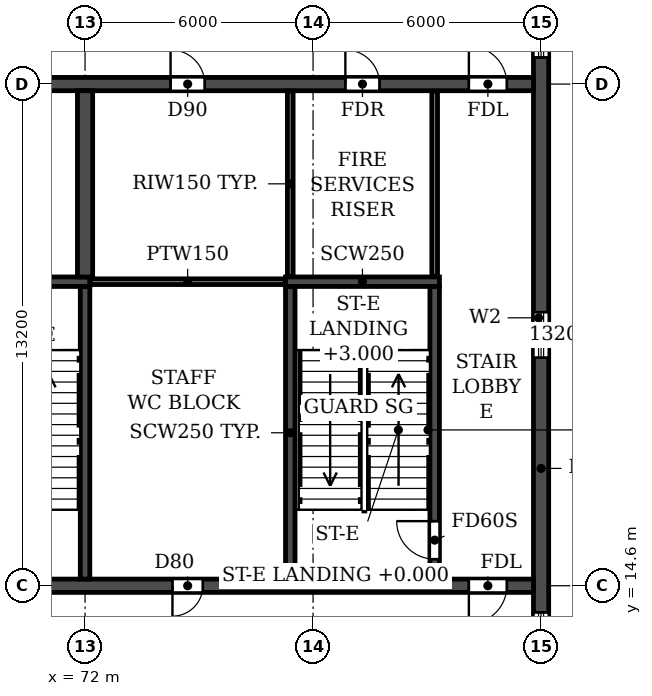
"""IFC4 building model, lengths in metres.
Left out: names, types, materials, properties, quantities, classifications, styles, units other than length and angle.
Written with IfcOpenShell. Run it as: python <this file> out.ifc"""

import sys

from ifc_helpers import new_model, si_unit, direction, frame, frame_2d, origin, place, context, subcontext, project, spatial, rectangle, extrude, element, fill, save


model = new_model("IFC4")
c1 = context("Model", 3, precision=1e-05, world=origin(), true_north=direction((0.0, 1.0)))
c2 = subcontext(c1, "Body", "Model", "MODEL_VIEW")
j1 = project(units=[si_unit("LENGTHUNIT", "METRE"), si_unit("PLANEANGLEUNIT", "RADIAN")], contexts=[c1])
p1 = place(None, origin())
s1 = spatial("IfcSite", under=j1, at=p1, CompositionType="ELEMENT")
p2 = place(p1, origin())
s2 = spatial("IfcBuilding", under=s1, at=p2, CompositionType="ELEMENT")
p3 = place(p2, frame((0.0, 0.0, 261.0)))
s3 = spatial("IfcBuildingStorey", under=s2, at=p3, CompositionType="ELEMENT", Elevation=261.0)
p4 = place(p3, frame((84.0, 4.683, 0.0), z_axis=(0.0, 0.0, 1.0), x_axis=(0.0, 1.0, 0.0)))
e1 = element("IfcWall", 1, at=p4, inside=s3, PredefinedType="SHEAR", context=c2, shape_type="SweptSolid", body=[
    extrude(rectangle(XDim=31.834, YDim=0.4, at=frame_2d((15.917, 0.0))), origin(), (0.0, 0.0, 1.0), 5.7),
])
p5 = place(p4, frame((23.817, 0.0, 0.9)))
e2 = element("IfcOpeningElement", 2, at=p5, cuts=e1, PredefinedType="OPENING", context=c2, shape_type="SweptSolid", body=[
    extrude(rectangle(XDim=1.2, YDim=1.5, at=frame_2d((0.6, 0.75))), frame((0.0, 0.21, 0.0), z_axis=(0.0, -1.0, 0.0), x_axis=(1.0, 0.0, 0.0)), (0.0, 0.0, 1.0), 0.42),
])
p6 = place(p4, frame((8.017, 0.0, 0.9)))
e3 = element("IfcOpeningElement", 3, at=p6, cuts=e1, PredefinedType="OPENING", context=c2, shape_type="SweptSolid", body=[
    extrude(rectangle(XDim=1.2, YDim=1.5, at=frame_2d((0.6, 0.75))), frame((0.0, 0.21, 0.0), z_axis=(0.0, -1.0, 0.0), x_axis=(1.0, 0.0, 0.0)), (0.0, 0.0, 1.0), 0.42),
])
p7 = place(p4, frame((27.694, 0.0, 0.6)))
e4 = element("IfcOpeningElement", 4, at=p7, cuts=e1, PredefinedType="OPENING", context=c2, shape_type="SweptSolid", body=[
    extrude(rectangle(XDim=2.2, YDim=1.8, at=frame_2d((1.1, 0.9))), frame((0.0, 0.21, 0.0), z_axis=(0.0, -1.0, 0.0), x_axis=(1.0, 0.0, 0.0)), (0.0, 0.0, 1.0), 0.42),
])
p8 = place(p4, frame((2.541, 0.0, 0.6)))
e5 = element("IfcOpeningElement", 5, at=p8, cuts=e1, PredefinedType="OPENING", context=c2, shape_type="SweptSolid", body=[
    extrude(rectangle(XDim=2.2, YDim=1.8, at=frame_2d((1.1, 0.9))), frame((0.0, 0.21, 0.0), z_axis=(0.0, -1.0, 0.0), x_axis=(1.0, 0.0, 0.0)), (0.0, 0.0, 1.0), 0.42),
])
p9 = place(p4, frame((15.917, 0.0, 0.9)))
e6 = element("IfcOpeningElement", 6, at=p9, cuts=e1, PredefinedType="OPENING", context=c2, shape_type="SweptSolid", body=[
    extrude(rectangle(XDim=1.2, YDim=1.5, at=frame_2d((0.6, 0.75))), frame((0.0, 0.21, 0.0), z_axis=(0.0, -1.0, 0.0), x_axis=(1.0, 0.0, 0.0)), (0.0, 0.0, 1.0), 0.42),
])
p10 = place(p3, frame((18.2, 14.6, 0.0), z_axis=(0.0, 0.0, 1.0), x_axis=(1.0, 0.0, 0.0)))
e7 = element("IfcWall", 7, at=p10, inside=s3, PredefinedType="SOLIDWALL", context=c2, shape_type="SweptSolid", body=[
    extrude(rectangle(XDim=65.6, YDim=0.35, at=frame_2d((32.8, 0.0))), origin(), (0.0, 0.0, 1.0), 5.7),
])
p11 = place(p10, frame((0.7, 0.0, 0.0)))
e8 = element("IfcOpeningElement", 8, at=p11, cuts=e7, PredefinedType="OPENING", context=c2, shape_type="SweptSolid", body=[
    extrude(rectangle(XDim=1.0, YDim=2.1, at=frame_2d((0.5, 1.05))), frame((0.0, 0.185, 0.0), z_axis=(0.0, -1.0, 0.0), x_axis=(1.0, 0.0, 0.0)), (0.0, 0.0, 1.0), 0.37),
])
p12 = place(p10, frame((8.7, 0.0, 0.0)))
e9 = element("IfcOpeningElement", 9, at=p12, cuts=e7, PredefinedType="OPENING", context=c2, shape_type="SweptSolid", body=[
    extrude(rectangle(XDim=0.8, YDim=2.1, at=frame_2d((0.4, 1.05))), frame((0.0, 0.185, 0.0), z_axis=(0.0, -1.0, 0.0), x_axis=(1.0, 0.0, 0.0)), (0.0, 0.0, 1.0), 0.37),
])
p13 = place(p10, frame((13.2, 0.0, 0.0)))
e10 = element("IfcOpeningElement", 10, at=p13, cuts=e7, PredefinedType="OPENING", context=c2, shape_type="SweptSolid", body=[
    extrude(rectangle(XDim=1.0, YDim=2.1, at=frame_2d((0.5, 1.05))), frame((0.0, 0.185, 0.0), z_axis=(0.0, -1.0, 0.0), x_axis=(1.0, 0.0, 0.0)), (0.0, 0.0, 1.0), 0.37),
])
p14 = place(p10, frame((25.55, 0.0, 0.0)))
e11 = element("IfcOpeningElement", 11, at=p14, cuts=e7, PredefinedType="OPENING", context=c2, shape_type="SweptSolid", body=[
    extrude(rectangle(XDim=1.5, YDim=2.1, at=frame_2d((0.75, 1.05))), frame((0.0, 0.185, 0.0), z_axis=(0.0, -1.0, 0.0), x_axis=(1.0, 0.0, 0.0)), (0.0, 0.0, 1.0), 0.37),
])
p15 = place(p10, frame((29.7, 0.0, 0.0)))
e12 = element("IfcOpeningElement", 12, at=p15, cuts=e7, PredefinedType="OPENING", context=c2, shape_type="SweptSolid", body=[
    extrude(rectangle(XDim=1.0, YDim=2.1, at=frame_2d((0.5, 1.05))), frame((0.0, 0.185, 0.0), z_axis=(0.0, -1.0, 0.0), x_axis=(1.0, 0.0, 0.0)), (0.0, 0.0, 1.0), 0.37),
])
p16 = place(p10, frame((32.3, 0.0, 0.0)))
e13 = element("IfcOpeningElement", 13, at=p16, cuts=e7, PredefinedType="OPENING", context=c2, shape_type="SweptSolid", body=[
    extrude(rectangle(XDim=1.0, YDim=2.1, at=frame_2d((0.5, 1.05))), frame((0.0, 0.185, 0.0), z_axis=(0.0, -1.0, 0.0), x_axis=(1.0, 0.0, 0.0)), (0.0, 0.0, 1.0), 0.37),
])
p17 = place(p10, frame((34.9, 0.0, 0.0)))
e14 = element("IfcOpeningElement", 14, at=p17, cuts=e7, PredefinedType="OPENING", context=c2, shape_type="SweptSolid", body=[
    extrude(rectangle(XDim=1.0, YDim=2.1, at=frame_2d((0.5, 1.05))), frame((0.0, 0.185, 0.0), z_axis=(0.0, -1.0, 0.0), x_axis=(1.0, 0.0, 0.0)), (0.0, 0.0, 1.0), 0.37),
])
p18 = place(p10, frame((38.55, 0.0, 0.0)))
e15 = element("IfcOpeningElement", 15, at=p18, cuts=e7, PredefinedType="OPENING", context=c2, shape_type="SweptSolid", body=[
    extrude(rectangle(XDim=1.5, YDim=2.1, at=frame_2d((0.75, 1.05))), frame((0.0, 0.185, 0.0), z_axis=(0.0, -1.0, 0.0), x_axis=(1.0, 0.0, 0.0)), (0.0, 0.0, 1.0), 0.37),
])
p19 = place(p10, frame((51.4, 0.0, 0.0)))
e16 = element("IfcOpeningElement", 16, at=p19, cuts=e7, PredefinedType="OPENING", context=c2, shape_type="SweptSolid", body=[
    extrude(rectangle(XDim=1.0, YDim=2.1, at=frame_2d((0.5, 1.05))), frame((0.0, 0.185, 0.0), z_axis=(0.0, -1.0, 0.0), x_axis=(1.0, 0.0, 0.0)), (0.0, 0.0, 1.0), 0.37),
])
p20 = place(p10, frame((56.1, 0.0, 0.0)))
e17 = element("IfcOpeningElement", 17, at=p20, cuts=e7, PredefinedType="OPENING", context=c2, shape_type="SweptSolid", body=[
    extrude(rectangle(XDim=0.8, YDim=2.1, at=frame_2d((0.4, 1.05))), frame((0.0, 0.185, 0.0), z_axis=(0.0, -1.0, 0.0), x_axis=(1.0, 0.0, 0.0)), (0.0, 0.0, 1.0), 0.37),
])
p21 = place(p10, frame((63.9, 0.0, 0.0)))
e18 = element("IfcOpeningElement", 18, at=p21, cuts=e7, PredefinedType="OPENING", context=c2, shape_type="SweptSolid", body=[
    extrude(rectangle(XDim=1.0, YDim=2.1, at=frame_2d((0.5, 1.05))), frame((0.0, 0.185, 0.0), z_axis=(0.0, -1.0, 0.0), x_axis=(1.0, 0.0, 0.0)), (0.0, 0.0, 1.0), 0.37),
])
p22 = place(p3, frame((18.2, 27.8, 0.0), z_axis=(0.0, 0.0, 1.0), x_axis=(1.0, 0.0, 0.0)))
e19 = element("IfcWall", 19, at=p22, inside=s3, PredefinedType="SOLIDWALL", context=c2, shape_type="SweptSolid", body=[
    extrude(rectangle(XDim=65.6, YDim=0.35, at=frame_2d((32.8, 0.0))), origin(), (0.0, 0.0, 1.0), 5.7),
])
p23 = place(p22, frame((0.7, 0.0, 0.0)))
e20 = element("IfcOpeningElement", 20, at=p23, cuts=e19, PredefinedType="OPENING", context=c2, shape_type="SweptSolid", body=[
    extrude(rectangle(XDim=1.0, YDim=2.1, at=frame_2d((0.5, 1.05))), frame((0.0, 0.185, 0.0), z_axis=(0.0, -1.0, 0.0), x_axis=(1.0, 0.0, 0.0)), (0.0, 0.0, 1.0), 0.37),
])
p24 = place(p22, frame((4.05, 0.0, 0.0)))
e21 = element("IfcOpeningElement", 21, at=p24, cuts=e19, PredefinedType="OPENING", context=c2, shape_type="SweptSolid", body=[
    extrude(rectangle(XDim=0.9, YDim=2.1, at=frame_2d((0.45, 1.05))), frame((0.0, 0.185, 0.0), z_axis=(0.0, -1.0, 0.0), x_axis=(1.0, 0.0, 0.0)), (0.0, 0.0, 1.0), 0.37),
])
p25 = place(p22, frame((8.65, 0.0, 0.0)))
e22 = element("IfcOpeningElement", 22, at=p25, cuts=e19, PredefinedType="OPENING", context=c2, shape_type="SweptSolid", body=[
    extrude(rectangle(XDim=0.9, YDim=2.1, at=frame_2d((0.45, 1.05))), frame((0.0, 0.185, 0.0), z_axis=(0.0, -1.0, 0.0), x_axis=(1.0, 0.0, 0.0)), (0.0, 0.0, 1.0), 0.37),
])
p26 = place(p22, frame((13.25, 0.0, 0.0)))
e23 = element("IfcOpeningElement", 23, at=p26, cuts=e19, PredefinedType="OPENING", context=c2, shape_type="SweptSolid", body=[
    extrude(rectangle(XDim=0.9, YDim=2.1, at=frame_2d((0.45, 1.05))), frame((0.0, 0.185, 0.0), z_axis=(0.0, -1.0, 0.0), x_axis=(1.0, 0.0, 0.0)), (0.0, 0.0, 1.0), 0.37),
])
p27 = place(p22, frame((16.4, 0.0, 0.0)))
e24 = element("IfcOpeningElement", 24, at=p27, cuts=e19, PredefinedType="OPENING", context=c2, shape_type="SweptSolid", body=[
    extrude(rectangle(XDim=1.0, YDim=2.1, at=frame_2d((0.5, 1.05))), frame((0.0, 0.185, 0.0), z_axis=(0.0, -1.0, 0.0), x_axis=(1.0, 0.0, 0.0)), (0.0, 0.0, 1.0), 0.37),
])
p28 = place(p22, frame((21.6, 0.0, 0.0)))
e25 = element("IfcOpeningElement", 25, at=p28, cuts=e19, PredefinedType="OPENING", context=c2, shape_type="SweptSolid", body=[
    extrude(rectangle(XDim=1.0, YDim=2.1, at=frame_2d((0.5, 1.05))), frame((0.0, 0.185, 0.0), z_axis=(0.0, -1.0, 0.0), x_axis=(1.0, 0.0, 0.0)), (0.0, 0.0, 1.0), 0.37),
])
p29 = place(p22, frame((29.4, 0.0, 0.0)))
e26 = element("IfcOpeningElement", 26, at=p29, cuts=e19, PredefinedType="OPENING", context=c2, shape_type="SweptSolid", body=[
    extrude(rectangle(XDim=1.0, YDim=2.1, at=frame_2d((0.5, 1.05))), frame((0.0, 0.185, 0.0), z_axis=(0.0, -1.0, 0.0), x_axis=(1.0, 0.0, 0.0)), (0.0, 0.0, 1.0), 0.37),
])
p30 = place(p22, frame((32.3, 0.0, 0.0)))
e27 = element("IfcOpeningElement", 27, at=p30, cuts=e19, PredefinedType="OPENING", context=c2, shape_type="SweptSolid", body=[
    extrude(rectangle(XDim=1.0, YDim=2.1, at=frame_2d((0.5, 1.05))), frame((0.0, 0.185, 0.0), z_axis=(0.0, -1.0, 0.0), x_axis=(1.0, 0.0, 0.0)), (0.0, 0.0, 1.0), 0.37),
])
p31 = place(p22, frame((35.2, 0.0, 0.0)))
e28 = element("IfcOpeningElement", 28, at=p31, cuts=e19, PredefinedType="OPENING", context=c2, shape_type="SweptSolid", body=[
    extrude(rectangle(XDim=1.0, YDim=2.1, at=frame_2d((0.5, 1.05))), frame((0.0, 0.185, 0.0), z_axis=(0.0, -1.0, 0.0), x_axis=(1.0, 0.0, 0.0)), (0.0, 0.0, 1.0), 0.37),
])
p32 = place(p22, frame((37.8, 0.0, 0.0)))
e29 = element("IfcOpeningElement", 29, at=p32, cuts=e19, PredefinedType="OPENING", context=c2, shape_type="SweptSolid", body=[
    extrude(rectangle(XDim=1.0, YDim=2.1, at=frame_2d((0.5, 1.05))), frame((0.0, 0.185, 0.0), z_axis=(0.0, -1.0, 0.0), x_axis=(1.0, 0.0, 0.0)), (0.0, 0.0, 1.0), 0.37),
])
p33 = place(p22, frame((41.7, 0.0, 0.0)))
e30 = element("IfcOpeningElement", 30, at=p33, cuts=e19, PredefinedType="OPENING", context=c2, shape_type="SweptSolid", body=[
    extrude(rectangle(XDim=1.0, YDim=2.1, at=frame_2d((0.5, 1.05))), frame((0.0, 0.185, 0.0), z_axis=(0.0, -1.0, 0.0), x_axis=(1.0, 0.0, 0.0)), (0.0, 0.0, 1.0), 0.37),
])
p34 = place(p22, frame((45.6, 0.0, 0.0)))
e31 = element("IfcOpeningElement", 31, at=p34, cuts=e19, PredefinedType="OPENING", context=c2, shape_type="SweptSolid", body=[
    extrude(rectangle(XDim=1.0, YDim=2.1, at=frame_2d((0.5, 1.05))), frame((0.0, 0.185, 0.0), z_axis=(0.0, -1.0, 0.0), x_axis=(1.0, 0.0, 0.0)), (0.0, 0.0, 1.0), 0.37),
])
p35 = place(p22, frame((48.2, 0.0, 0.0)))
e32 = element("IfcOpeningElement", 32, at=p35, cuts=e19, PredefinedType="OPENING", context=c2, shape_type="SweptSolid", body=[
    extrude(rectangle(XDim=1.0, YDim=2.1, at=frame_2d((0.5, 1.05))), frame((0.0, 0.185, 0.0), z_axis=(0.0, -1.0, 0.0), x_axis=(1.0, 0.0, 0.0)), (0.0, 0.0, 1.0), 0.37),
])
p36 = place(p22, frame((51.45, 0.0, 0.0)))
e33 = element("IfcOpeningElement", 33, at=p36, cuts=e19, PredefinedType="OPENING", context=c2, shape_type="SweptSolid", body=[
    extrude(rectangle(XDim=0.9, YDim=2.1, at=frame_2d((0.45, 1.05))), frame((0.0, 0.185, 0.0), z_axis=(0.0, -1.0, 0.0), x_axis=(1.0, 0.0, 0.0)), (0.0, 0.0, 1.0), 0.37),
])
p37 = place(p22, frame((56.05, 0.0, 0.0)))
e34 = element("IfcOpeningElement", 34, at=p37, cuts=e19, PredefinedType="OPENING", context=c2, shape_type="SweptSolid", body=[
    extrude(rectangle(XDim=0.9, YDim=2.1, at=frame_2d((0.45, 1.05))), frame((0.0, 0.185, 0.0), z_axis=(0.0, -1.0, 0.0), x_axis=(1.0, 0.0, 0.0)), (0.0, 0.0, 1.0), 0.37),
])
p38 = place(p22, frame((60.65, 0.0, 0.0)))
e35 = element("IfcOpeningElement", 35, at=p38, cuts=e19, PredefinedType="OPENING", context=c2, shape_type="SweptSolid", body=[
    extrude(rectangle(XDim=0.9, YDim=2.1, at=frame_2d((0.45, 1.05))), frame((0.0, 0.185, 0.0), z_axis=(0.0, -1.0, 0.0), x_axis=(1.0, 0.0, 0.0)), (0.0, 0.0, 1.0), 0.37),
])
p39 = place(p22, frame((63.9, 0.0, 0.0)))
e36 = element("IfcOpeningElement", 36, at=p39, cuts=e19, PredefinedType="OPENING", context=c2, shape_type="SweptSolid", body=[
    extrude(rectangle(XDim=1.0, YDim=2.1, at=frame_2d((0.5, 1.05))), frame((0.0, 0.185, 0.0), z_axis=(0.0, -1.0, 0.0), x_axis=(1.0, 0.0, 0.0)), (0.0, 0.0, 1.0), 0.37),
])
p40 = place(p3, frame((72.0, 22.725, 0.0), z_axis=(0.0, 0.0, 1.0), x_axis=(0.0, 1.0, 0.0)))
e37 = element("IfcWall", 37, at=p40, inside=s3, PredefinedType="SOLIDWALL", context=c2, shape_type="SweptSolid", body=[
    extrude(rectangle(XDim=4.9, YDim=0.4, at=frame_2d((2.45, 0.0))), origin(), (0.0, 0.0, 1.0), 5.7),
])
p41 = place(p3, frame((72.0, 14.775, 0.0), z_axis=(0.0, 0.0, 1.0), x_axis=(0.0, 1.0, 0.0)))
e38 = element("IfcWall", 38, at=p41, inside=s3, PredefinedType="SOLIDWALL", context=c2, shape_type="SweptSolid", body=[
    extrude(rectangle(XDim=7.7, YDim=0.25, at=frame_2d((3.85, 0.0))), origin(), (0.0, 0.0, 1.0), 5.7),
])
p42 = place(p3, frame((68.075, 22.6, 0.0), z_axis=(0.0, 0.0, 1.0), x_axis=(1.0, 0.0, 0.0)))
e39 = element("IfcWall", 39, at=p42, inside=s3, PredefinedType="SOLIDWALL", context=c2, shape_type="SweptSolid", body=[
    extrude(rectangle(XDim=4.05, YDim=0.25, at=frame_2d((2.025, 0.0))), origin(), (0.0, 0.0, 1.0), 5.7),
])
p43 = place(p3, frame((77.4, 14.775, 0.0), z_axis=(0.0, 0.0, 1.0), x_axis=(0.0, 1.0, 0.0)))
e40 = element("IfcWall", 40, at=p43, inside=s3, PredefinedType="SOLIDWALL", context=c2, shape_type="SweptSolid", body=[
    extrude(rectangle(XDim=7.7, YDim=0.25, at=frame_2d((3.85, 0.0))), origin(), (0.0, 0.0, 1.0), 5.7),
])
p44 = place(p3, frame((81.2, 14.775, 0.0), z_axis=(0.0, 0.0, 1.0), x_axis=(0.0, 1.0, 0.0)))
e41 = element("IfcWall", 41, at=p44, inside=s3, PredefinedType="SOLIDWALL", context=c2, shape_type="SweptSolid", body=[
    extrude(rectangle(XDim=7.7, YDim=0.25, at=frame_2d((3.85, 0.0))), origin(), (0.0, 0.0, 1.0), 5.7),
])
p45 = place(p44, frame((0.525, 0.0, 0.0)))
e42 = element("IfcOpeningElement", 42, at=p45, cuts=e41, PredefinedType="OPENING", context=c2, shape_type="SweptSolid", body=[
    extrude(rectangle(XDim=1.0, YDim=2.1, at=frame_2d((0.5, 1.05))), frame((0.0, 0.135, 0.0), z_axis=(0.0, -1.0, 0.0), x_axis=(1.0, 0.0, 0.0)), (0.0, 0.0, 1.0), 0.27),
])
p46 = place(p3, frame((77.275, 22.6, 0.0), z_axis=(0.0, 0.0, 1.0), x_axis=(1.0, 0.0, 0.0)))
e43 = element("IfcWall", 43, at=p46, inside=s3, PredefinedType="SOLIDWALL", context=c2, shape_type="SweptSolid", body=[
    extrude(rectangle(XDim=4.05, YDim=0.25, at=frame_2d((2.025, 0.0))), origin(), (0.0, 0.0, 1.0), 5.7),
])
p47 = place(p3, frame((72.135, 22.6, 0.0), z_axis=(0.0, 0.0, 1.0), x_axis=(1.0, 0.0, 0.0)))
e44 = element("IfcWall", 44, at=p47, inside=s3, PredefinedType="PARTITIONING", context=c2, shape_type="SweptSolid", body=[
    extrude(rectangle(XDim=5.13, YDim=0.15, at=frame_2d((2.565, 0.0))), origin(), (0.0, 0.0, 1.0), 5.7),
])
for number, where, z_axis, x_axis in (
    (45, (77.4, 22.735, 0.0), (0.0, 0.0, 1.0), (0.0, 1.0, 0.0)),
    (46, (81.2, 22.735, 0.0), (0.0, 0.0, 1.0), (0.0, 1.0, 0.0)),
):
    element("IfcWall", number, at=place(p3, frame(where, z_axis=z_axis, x_axis=x_axis)), inside=s3, PredefinedType="PARTITIONING", context=c2, shape_type="SweptSolid", body=[
        extrude(rectangle(XDim=4.88, YDim=0.15, at=frame_2d((2.44, 0.0))), origin(), (0.0, 0.0, 1.0), 5.7),
    ])
p48 = place(p5, origin())
e47 = element("IfcWindow", 47, at=p48, inside=s3, PartitioningType="SINGLE_PANEL", PredefinedType="WINDOW", context=c2, shape_type="SweptSolid", body=[
    extrude(rectangle(XDim=1.2, YDim=1.5, at=frame_2d((0.6, 0.75))), frame((0.0, 0.03, 0.0), z_axis=(0.0, -1.0, 0.0), x_axis=(1.0, 0.0, 0.0)), (0.0, 0.0, 1.0), 0.06),
])
fill(e2, e47)
p49 = place(p6, origin())
e48 = element("IfcWindow", 48, at=p49, inside=s3, PartitioningType="SINGLE_PANEL", PredefinedType="WINDOW", context=c2, shape_type="SweptSolid", body=[
    extrude(rectangle(XDim=1.2, YDim=1.5, at=frame_2d((0.6, 0.75))), frame((0.0, 0.03, 0.0), z_axis=(0.0, -1.0, 0.0), x_axis=(1.0, 0.0, 0.0)), (0.0, 0.0, 1.0), 0.06),
])
fill(e3, e48)
p50 = place(p9, origin())
e49 = element("IfcWindow", 49, at=p50, inside=s3, PartitioningType="SINGLE_PANEL", PredefinedType="WINDOW", context=c2, shape_type="SweptSolid", body=[
    extrude(rectangle(XDim=1.2, YDim=1.5, at=frame_2d((0.6, 0.75))), frame((0.0, 0.03, 0.0), z_axis=(0.0, -1.0, 0.0), x_axis=(1.0, 0.0, 0.0)), (0.0, 0.0, 1.0), 0.06),
])
fill(e6, e49)
p51 = place(p37, origin())
e50 = element("IfcDoor", 50, at=p51, inside=s3, OperationType="SINGLE_SWING_LEFT", PredefinedType="DOOR", context=c2, shape_type="SweptSolid", body=[
    extrude(rectangle(XDim=0.9, YDim=2.1, at=frame_2d((0.45, 1.05))), frame((0.0, 0.025, 0.0), z_axis=(0.0, -1.0, 0.0), x_axis=(1.0, 0.0, 0.0)), (0.0, 0.0, 1.0), 0.05),
])
fill(e34, e50)
p52 = place(p38, origin())
e51 = element("IfcDoor", 51, at=p52, inside=s3, OperationType="SINGLE_SWING_LEFT", PredefinedType="DOOR", context=c2, shape_type="SweptSolid", body=[
    extrude(rectangle(XDim=0.9, YDim=2.1, at=frame_2d((0.45, 1.05))), frame((0.0, 0.025, 0.0), z_axis=(0.0, -1.0, 0.0), x_axis=(1.0, 0.0, 0.0)), (0.0, 0.0, 1.0), 0.05),
])
fill(e35, e51)
p53 = place(p39, origin())
e52 = element("IfcDoor", 52, at=p53, inside=s3, OperationType="SINGLE_SWING_LEFT", PredefinedType="DOOR", context=c2, shape_type="SweptSolid", body=[
    extrude(rectangle(XDim=1.0, YDim=2.1, at=frame_2d((0.5, 1.05))), frame((0.0, 0.025, 0.0), z_axis=(0.0, -1.0, 0.0), x_axis=(1.0, 0.0, 0.0)), (0.0, 0.0, 1.0), 0.05),
])
fill(e36, e52)
p54 = place(p20, frame((0.8, 0.0, 0.0), z_axis=(0.0, 0.0, 1.0), x_axis=(-1.0, 0.0, 0.0)))
e53 = element("IfcDoor", 53, at=p54, inside=s3, OperationType="SINGLE_SWING_RIGHT", PredefinedType="DOOR", context=c2, shape_type="SweptSolid", body=[
    extrude(rectangle(XDim=0.8, YDim=2.1, at=frame_2d((0.4, 1.05))), frame((0.0, 0.025, 0.0), z_axis=(0.0, -1.0, 0.0), x_axis=(1.0, 0.0, 0.0)), (0.0, 0.0, 1.0), 0.05),
])
fill(e17, e53)
p55 = place(p21, frame((1.0, 0.0, 0.0), z_axis=(0.0, 0.0, 1.0), x_axis=(-1.0, 0.0, 0.0)))
e54 = element("IfcDoor", 54, at=p55, inside=s3, OperationType="SINGLE_SWING_RIGHT", PredefinedType="DOOR", context=c2, shape_type="SweptSolid", body=[
    extrude(rectangle(XDim=1.0, YDim=2.1, at=frame_2d((0.5, 1.05))), frame((0.0, 0.025, 0.0), z_axis=(0.0, -1.0, 0.0), x_axis=(1.0, 0.0, 0.0)), (0.0, 0.0, 1.0), 0.05),
])
fill(e18, e54)
p56 = place(p45, origin())
e55 = element("IfcDoor", 55, at=p56, inside=s3, OperationType="SINGLE_SWING_RIGHT", PredefinedType="DOOR", context=c2, shape_type="SweptSolid", body=[
    extrude(rectangle(XDim=1.0, YDim=2.1, at=frame_2d((0.5, 1.05))), frame((0.0, 0.025, 0.0), z_axis=(0.0, -1.0, 0.0), x_axis=(1.0, 0.0, 0.0)), (0.0, 0.0, 1.0), 0.05),
])
fill(e42, e55)
save(model, sys.argv[1])
